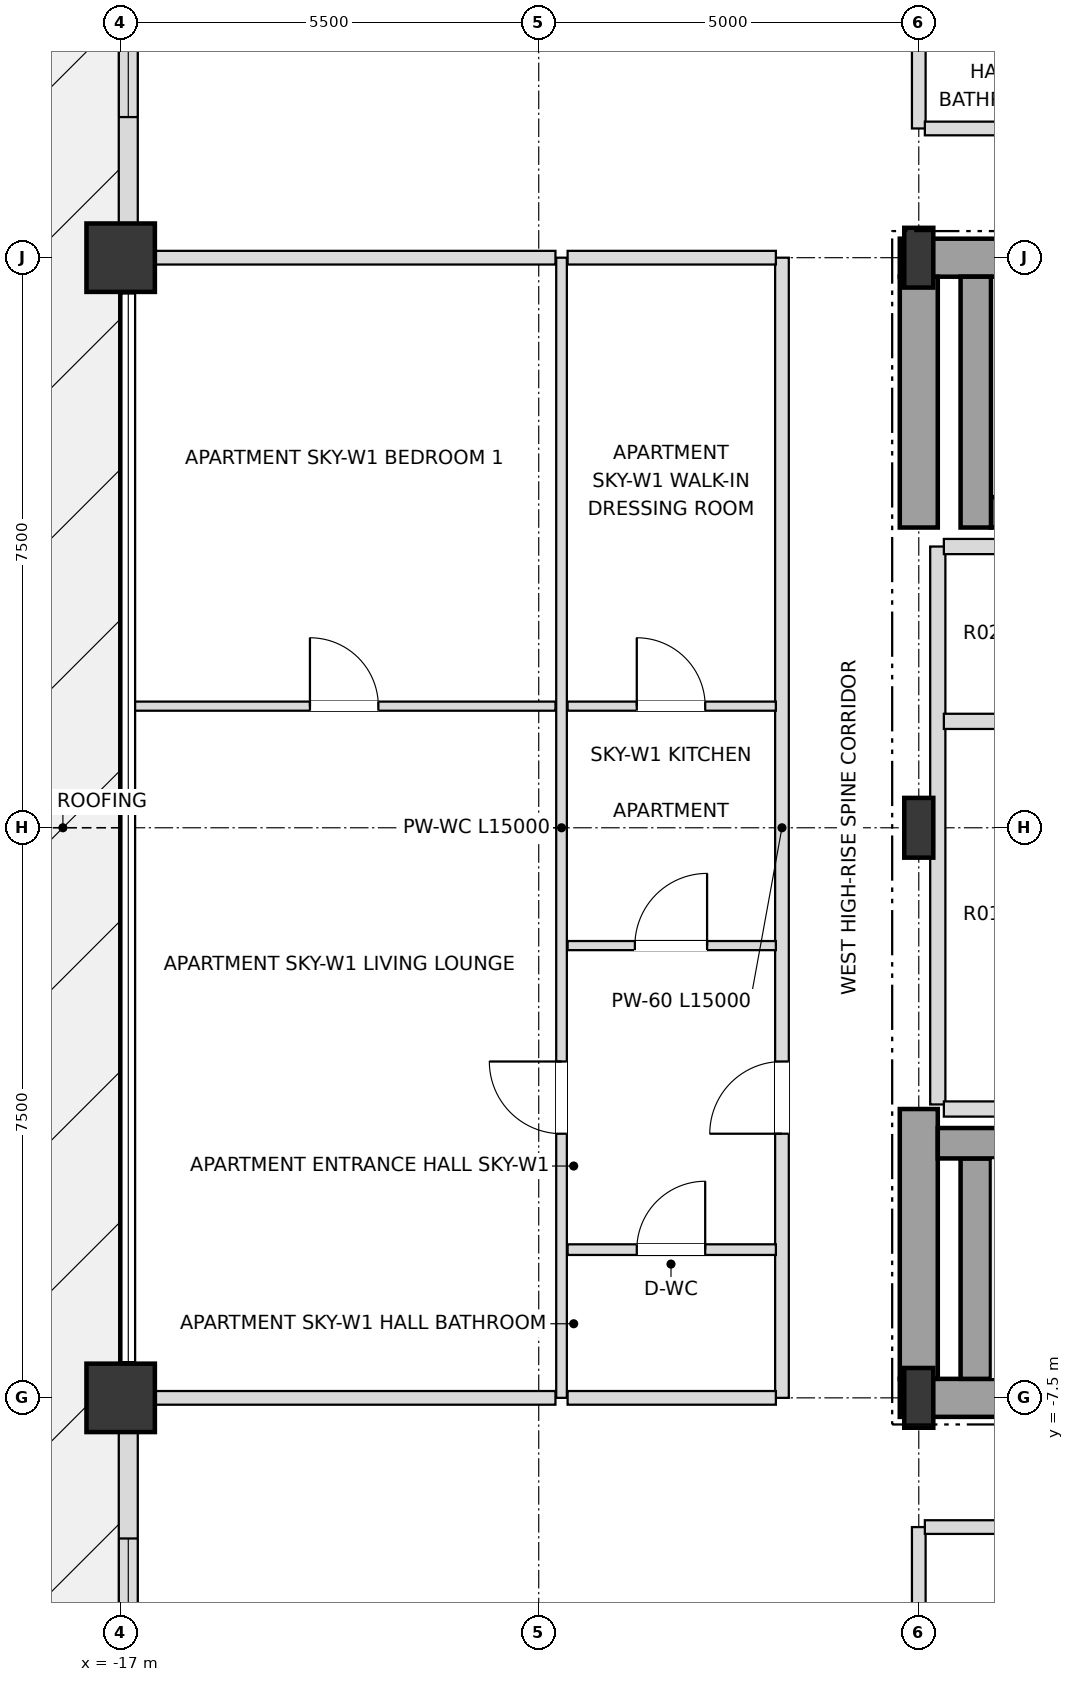
"""IFC4 building model, lengths in metres.
Left out: names, types, materials, properties, quantities, classifications, styles, units other than length and angle.
Written with IfcOpenShell. Run it as: python <this file> out.ifc"""

import sys

from ifc_helpers import new_model, si_unit, direction, frame, frame_2d, origin, origin_2d, place, context, subcontext, project, spatial, rectangle, i_section, extrude, element, fill, save


model = new_model("IFC4")
c1 = context("Model", 3, precision=1e-05, world=origin(), true_north=direction((0.0, 1.0)))
c2 = subcontext(c1, "Body", "Model", "MODEL_VIEW")
j1 = project(units=[si_unit("LENGTHUNIT", "METRE"), si_unit("PLANEANGLEUNIT", "RADIAN")], contexts=[c1])
p1 = place(None, origin())
s1 = spatial("IfcSite", under=j1, at=p1, CompositionType="ELEMENT")
p2 = place(p1, origin())
s2 = spatial("IfcBuilding", under=s1, at=p2, CompositionType="ELEMENT")
p3 = place(p2, frame((0.0, 0.0, 217.8)))
s3 = spatial("IfcBuildingStorey", under=s2, at=p3, CompositionType="ELEMENT", Elevation=217.8)
for number, where, z_axis, x_axis in (
    (1, (-6.5, -7.5, 0.0), (0.0, 0.0, 1.0), (1.0, 0.0, 0.0)),
    (2, (-6.5, 0.0, 0.0), (0.0, 0.0, 1.0), (1.0, 0.0, 0.0)),
    (3, (-6.5, 7.5, 0.0), (0.0, 0.0, 1.0), (1.0, 0.0, 0.0)),
):
    element("IfcColumn", number, at=place(p3, frame(where, z_axis=z_axis, x_axis=x_axis)), inside=s3, PredefinedType="COLUMN", context=c2, shape_type="SweptSolid", body=[
        extrude(i_section(OverallWidth=0.382, OverallDepth=0.786, WebThickness=0.02, FlangeThickness=0.033, at=origin_2d()), origin(), (0.0, 0.0, 1.0), 4.5),
    ])
for number, where, z_axis, x_axis in (
    (4, (-17.0, 7.5, 0.0), (0.0, 0.0, 1.0), (1.0, 0.0, 0.0)),
    (5, (-17.0, -7.5, 0.0), (0.0, 0.0, 1.0), (1.0, 0.0, 0.0)),
):
    element("IfcColumn", number, at=place(p3, frame(where, z_axis=z_axis, x_axis=x_axis)), inside=s3, PredefinedType="USERDEFINED", context=c2, shape_type="SweptSolid", body=[
        extrude(rectangle(XDim=0.9, YDim=0.9, at=origin_2d()), origin(), (0.0, 0.0, 1.0), 4.5),
    ])
p4 = place(p3, frame((-16.9, 12.555, 0.0), z_axis=(0.0, 0.0, 1.0), x_axis=(0.0, -1.0, 0.0)))
e6 = element("IfcWall", 6, at=p4, inside=s3, PredefinedType="SOLIDWALL", context=c2, shape_type="SweptSolid", body=[
    extrude(rectangle(XDim=4.61, YDim=0.25, at=frame_2d((2.305, 0.0))), origin(), (0.0, 0.0, 1.0), 3.648),
])
p5 = place(p4, frame((1.405, 0.0, 0.72)))
e7 = element("IfcOpeningElement", 7, at=p5, cuts=e6, PredefinedType="OPENING", context=c2, shape_type="SweptSolid", body=[
    extrude(rectangle(XDim=1.8, YDim=1.68, at=frame_2d((0.9, 0.84))), frame((0.0, 0.135, 0.0), z_axis=(0.0, -1.0, 0.0), x_axis=(1.0, 0.0, 0.0)), (0.0, 0.0, 1.0), 0.27),
])
p6 = place(p3, frame((-16.9, -7.945, 0.0), z_axis=(0.0, 0.0, 1.0), x_axis=(0.0, -1.0, 0.0)))
e8 = element("IfcWall", 8, at=p6, inside=s3, PredefinedType="SOLIDWALL", context=c2, shape_type="SweptSolid", body=[
    extrude(rectangle(XDim=4.61, YDim=0.25, at=frame_2d((2.305, 0.0))), origin(), (0.0, 0.0, 1.0), 3.648),
])
p7 = place(p6, frame((1.405, 0.0, 0.72)))
e9 = element("IfcOpeningElement", 9, at=p7, cuts=e8, PredefinedType="OPENING", context=c2, shape_type="SweptSolid", body=[
    extrude(rectangle(XDim=1.8, YDim=1.68, at=frame_2d((0.9, 0.84))), frame((0.0, 0.135, 0.0), z_axis=(0.0, -1.0, 0.0), x_axis=(1.0, 0.0, 0.0)), (0.0, 0.0, 1.0), 0.27),
])
p8 = place(p3, frame((-6.75, -7.5, 0.0), z_axis=(0.0, 0.0, 1.0), x_axis=(1.0, 0.0, 0.0)))
e10 = element("IfcWall", 10, at=p8, inside=s3, PredefinedType="SHEAR", context=c2, shape_type="SweptSolid", body=[
    extrude(rectangle(XDim=6.75, YDim=0.5, at=frame_2d((3.375, 0.0))), origin(), (0.0, 0.0, 1.0), 4.28),
])
p9 = place(p3, frame((-6.75, 7.5, 0.0), z_axis=(0.0, 0.0, 1.0), x_axis=(1.0, 0.0, 0.0)))
e11 = element("IfcWall", 11, at=p9, inside=s3, PredefinedType="SHEAR", context=c2, shape_type="SweptSolid", body=[
    extrude(rectangle(XDim=6.75, YDim=0.5, at=frame_2d((3.375, 0.0))), origin(), (0.0, 0.0, 1.0), 4.28),
])
p10 = place(p9, frame((1.65, 0.0, 0.0)))
e12 = element("IfcOpeningElement", 12, at=p10, cuts=e11, PredefinedType="OPENING", context=c2, shape_type="SweptSolid", body=[
    extrude(rectangle(XDim=1.05, YDim=2.15, at=frame_2d((0.525, 1.075))), frame((0.0, 0.26, 0.0), z_axis=(0.0, -1.0, 0.0), x_axis=(1.0, 0.0, 0.0)), (0.0, 0.0, 1.0), 0.52),
])
p11 = place(p3, frame((-6.5, -7.25, 0.0), z_axis=(0.0, 0.0, 1.0), x_axis=(0.0, 1.0, 0.0)))
e13 = element("IfcWall", 13, at=p11, inside=s3, PredefinedType="SHEAR", context=c2, shape_type="SweptSolid", body=[
    extrude(rectangle(XDim=3.55, YDim=0.5, at=frame_2d((1.775, 0.0))), origin(), (0.0, 0.0, 1.0), 4.28),
])
p12 = place(p3, frame((-6.5, 3.95, 0.0), z_axis=(0.0, 0.0, 1.0), x_axis=(0.0, 1.0, 0.0)))
e14 = element("IfcWall", 14, at=p12, inside=s3, PredefinedType="SHEAR", context=c2, shape_type="SweptSolid", body=[
    extrude(rectangle(XDim=3.3, YDim=0.5, at=frame_2d((1.65, 0.0))), origin(), (0.0, 0.0, 1.0), 4.28),
])
p13 = place(p3, frame((-5.75, -7.25, 0.0), z_axis=(0.0, 0.0, 1.0), x_axis=(0.0, 1.0, 0.0)))
e15 = element("IfcWall", 15, at=p13, inside=s3, PredefinedType="SHEAR", context=c2, shape_type="SweptSolid", body=[
    extrude(rectangle(XDim=2.9, YDim=0.4, at=frame_2d((1.45, 0.0))), origin(), (0.0, 0.0, 1.0), 4.28),
])
p14 = place(p3, frame((-6.25, -4.15, 0.0), z_axis=(0.0, 0.0, 1.0), x_axis=(1.0, 0.0, 0.0)))
e16 = element("IfcWall", 16, at=p14, inside=s3, PredefinedType="SHEAR", context=c2, shape_type="SweptSolid", body=[
    extrude(rectangle(XDim=7.78, YDim=0.4, at=frame_2d((3.89, 0.0))), origin(), (0.0, 0.0, 1.0), 4.28),
])
p15 = place(p3, frame((-5.55, 4.15, 0.0), z_axis=(0.0, 0.0, 1.0), x_axis=(1.0, 0.0, 0.0)))
e17 = element("IfcWall", 17, at=p15, inside=s3, PredefinedType="SHEAR", context=c2, shape_type="SweptSolid", body=[
    extrude(rectangle(XDim=7.08, YDim=0.4, at=frame_2d((3.54, 0.0))), origin(), (0.0, 0.0, 1.0), 4.28),
])
p16 = place(p3, frame((-5.75, 3.95, 0.0), z_axis=(0.0, 0.0, 1.0), x_axis=(0.0, 1.0, 0.0)))
e18 = element("IfcWall", 18, at=p16, inside=s3, PredefinedType="SHEAR", context=c2, shape_type="SweptSolid", body=[
    extrude(rectangle(XDim=3.3, YDim=0.4, at=frame_2d((1.65, 0.0))), origin(), (0.0, 0.0, 1.0), 4.28),
])
p17 = place(p3, frame((-11.2, -7.5, 0.0), z_axis=(0.0, 0.0, 1.0), x_axis=(0.0, 1.0, 0.0)))
e19 = element("IfcWall", 19, at=p17, inside=s3, PredefinedType="PARTITIONING", context=c2, shape_type="SweptSolid", body=[
    extrude(rectangle(XDim=15.0, YDim=0.14, at=frame_2d((7.5, 0.0))), origin(), (0.0, 0.0, 1.0), 4.28),
])
p18 = place(p17, frame((3.475, 0.0, 0.0)))
e20 = element("IfcOpeningElement", 20, at=p18, cuts=e19, PredefinedType="OPENING", context=c2, shape_type="SweptSolid", body=[
    extrude(rectangle(XDim=0.95, YDim=2.1, at=frame_2d((0.475, 1.05))), frame((0.0, 0.08, 0.0), z_axis=(0.0, -1.0, 0.0), x_axis=(1.0, 0.0, 0.0)), (0.0, 0.0, 1.0), 0.16),
])
p19 = place(p3, frame((-8.3, -7.5, 0.0), z_axis=(0.0, 0.0, 1.0), x_axis=(0.0, 1.0, 0.0)))
e21 = element("IfcWall", 21, at=p19, inside=s3, PredefinedType="PARTITIONING", context=c2, shape_type="SweptSolid", body=[
    extrude(rectangle(XDim=15.0, YDim=0.18, at=frame_2d((7.5, 0.0))), origin(), (0.0, 0.0, 1.0), 4.28),
])
p20 = place(p19, frame((3.475, 0.0, 0.0)))
e22 = element("IfcOpeningElement", 22, at=p20, cuts=e21, PredefinedType="OPENING", context=c2, shape_type="SweptSolid", body=[
    extrude(rectangle(XDim=0.95, YDim=2.15, at=frame_2d((0.475, 1.075))), frame((0.0, 0.1, 0.0), z_axis=(0.0, -1.0, 0.0), x_axis=(1.0, 0.0, 0.0)), (0.0, 0.0, 1.0), 0.2),
])
for number, where, z_axis, x_axis in (
    (23, (-6.5, -19.9, 0.0), (0.0, 0.0, 1.0), (0.0, 1.0, 0.0)),
    (24, (-6.5, 9.2, 0.0), (0.0, 0.0, 1.0), (0.0, 1.0, 0.0)),
):
    element("IfcWall", number, at=place(p3, frame(where, z_axis=z_axis, x_axis=x_axis)), inside=s3, PredefinedType="PARTITIONING", context=c2, shape_type="SweptSolid", body=[
        extrude(rectangle(XDim=10.7, YDim=0.18, at=frame_2d((5.35, 0.0))), origin(), (0.0, 0.0, 1.0), 3.726),
    ])
p21 = place(p3, frame((-6.25, -3.64, 0.0), z_axis=(0.0, 0.0, 1.0), x_axis=(0.0, 1.0, 0.0)))
e25 = element("IfcWall", 25, at=p21, inside=s3, PredefinedType="SOLIDWALL", context=c2, shape_type="SweptSolid", body=[
    extrude(rectangle(XDim=7.34, YDim=0.2, at=frame_2d((3.67, 0.0))), origin(), (0.0, 0.0, 1.0), 4.28),
])
p22 = place(p3, frame((-6.42, -9.2, 0.0), z_axis=(0.0, 0.0, 1.0), x_axis=(1.0, 0.0, 0.0)))
e26 = element("IfcWall", 26, at=p22, inside=s3, PredefinedType="PARTITIONING", context=c2, shape_type="SweptSolid", body=[
    extrude(rectangle(XDim=6.34, YDim=0.18, at=frame_2d((3.17, 0.0))), origin(), (0.0, 0.0, 1.0), 4.28),
])
p23 = place(p22, frame((2.745, 0.0, 0.0)))
e27 = element("IfcOpeningElement", 27, at=p23, cuts=e26, PredefinedType="OPENING", context=c2, shape_type="SweptSolid", body=[
    extrude(rectangle(XDim=0.95, YDim=2.15, at=frame_2d((0.475, 1.075))), frame((0.0, 0.1, 0.0), z_axis=(0.0, -1.0, 0.0), x_axis=(1.0, 0.0, 0.0)), (0.0, 0.0, 1.0), 0.2),
])
p24 = place(p3, frame((-16.9, -7.5, 0.0), z_axis=(0.0, 0.0, 1.0), x_axis=(1.0, 0.0, 0.0)))
e28 = element("IfcWall", 28, at=p24, inside=s3, PredefinedType="PARTITIONING", context=c2, shape_type="SweptSolid", body=[
    extrude(rectangle(XDim=5.62, YDim=0.18, at=frame_2d((2.81, 0.0))), origin(), (0.0, 0.0, 1.0), 3.726),
])
p25 = place(p3, frame((-11.12, -7.5, 0.0), z_axis=(0.0, 0.0, 1.0), x_axis=(1.0, 0.0, 0.0)))
e29 = element("IfcWall", 29, at=p25, inside=s3, PredefinedType="PARTITIONING", context=c2, shape_type="SweptSolid", body=[
    extrude(rectangle(XDim=2.74, YDim=0.18, at=frame_2d((1.37, 0.0))), origin(), (0.0, 0.0, 1.0), 3.726),
])
p26 = place(p3, frame((-11.12, -5.55, 0.0), z_axis=(0.0, 0.0, 1.0), x_axis=(1.0, 0.0, 0.0)))
e30 = element("IfcWall", 30, at=p26, inside=s3, PredefinedType="PARTITIONING", context=c2, shape_type="SweptSolid", body=[
    extrude(rectangle(XDim=2.74, YDim=0.14, at=frame_2d((1.37, 0.0))), origin(), (0.0, 0.0, 1.0), 4.28),
])
p27 = place(p26, frame((0.91, 0.0, 0.0)))
e31 = element("IfcOpeningElement", 31, at=p27, cuts=e30, PredefinedType="OPENING", context=c2, shape_type="SweptSolid", body=[
    extrude(rectangle(XDim=0.9, YDim=2.1, at=frame_2d((0.45, 1.05))), frame((0.0, 0.08, 0.0), z_axis=(0.0, -1.0, 0.0), x_axis=(1.0, 0.0, 0.0)), (0.0, 0.0, 1.0), 0.16),
])
p28 = place(p3, frame((-6.17, -3.7, 0.0), z_axis=(0.0, 0.0, 1.0), x_axis=(1.0, 0.0, 0.0)))
e32 = element("IfcWall", 32, at=p28, inside=s3, PredefinedType="SOLIDWALL", context=c2, shape_type="SweptSolid", body=[
    extrude(rectangle(XDim=1.94, YDim=0.2, at=frame_2d((0.97, 0.0))), origin(), (0.0, 0.0, 1.0), 4.28),
])
p29 = place(p3, frame((-11.12, -1.55, 0.0), z_axis=(0.0, 0.0, 1.0), x_axis=(1.0, 0.0, 0.0)))
e33 = element("IfcWall", 33, at=p29, inside=s3, PredefinedType="PARTITIONING", context=c2, shape_type="SweptSolid", body=[
    extrude(rectangle(XDim=2.74, YDim=0.12, at=frame_2d((1.37, 0.0))), origin(), (0.0, 0.0, 1.0), 4.28),
])
p30 = place(p29, frame((0.885, 0.0, 0.0)))
e34 = element("IfcOpeningElement", 34, at=p30, cuts=e33, PredefinedType="OPENING", context=c2, shape_type="SweptSolid", body=[
    extrude(rectangle(XDim=0.95, YDim=2.1, at=frame_2d((0.475, 1.05))), frame((0.0, 0.07, 0.0), z_axis=(0.0, -1.0, 0.0), x_axis=(1.0, 0.0, 0.0)), (0.0, 0.0, 1.0), 0.14),
])
p31 = place(p3, frame((-6.17, 1.4, 0.0), z_axis=(0.0, 0.0, 1.0), x_axis=(1.0, 0.0, 0.0)))
e35 = element("IfcWall", 35, at=p31, inside=s3, PredefinedType="SOLIDWALL", context=c2, shape_type="SweptSolid", body=[
    extrude(rectangle(XDim=1.94, YDim=0.2, at=frame_2d((0.97, 0.0))), origin(), (0.0, 0.0, 1.0), 4.28),
])
p32 = place(p3, frame((-16.82, 1.6, 0.0), z_axis=(0.0, 0.0, 1.0), x_axis=(1.0, 0.0, 0.0)))
e36 = element("IfcWall", 36, at=p32, inside=s3, PredefinedType="PARTITIONING", context=c2, shape_type="SweptSolid", body=[
    extrude(rectangle(XDim=5.54, YDim=0.12, at=frame_2d((2.77, 0.0))), origin(), (0.0, 0.0, 1.0), 3.918),
])
p33 = place(p32, frame((2.31, 0.0, 0.0)))
e37 = element("IfcOpeningElement", 37, at=p33, cuts=e36, PredefinedType="OPENING", context=c2, shape_type="SweptSolid", body=[
    extrude(rectangle(XDim=0.9, YDim=2.1, at=frame_2d((0.45, 1.05))), frame((0.0, 0.07, 0.0), z_axis=(0.0, -1.0, 0.0), x_axis=(1.0, 0.0, 0.0)), (0.0, 0.0, 1.0), 0.14),
])
p34 = place(p3, frame((-11.12, 1.6, 0.0), z_axis=(0.0, 0.0, 1.0), x_axis=(1.0, 0.0, 0.0)))
e38 = element("IfcWall", 38, at=p34, inside=s3, PredefinedType="PARTITIONING", context=c2, shape_type="SweptSolid", body=[
    extrude(rectangle(XDim=2.74, YDim=0.12, at=frame_2d((1.37, 0.0))), origin(), (0.0, 0.0, 1.0), 4.28),
])
p35 = place(p34, frame((0.91, 0.0, 0.0)))
e39 = element("IfcOpeningElement", 39, at=p35, cuts=e38, PredefinedType="OPENING", context=c2, shape_type="SweptSolid", body=[
    extrude(rectangle(XDim=0.9, YDim=2.1, at=frame_2d((0.45, 1.05))), frame((0.0, 0.07, 0.0), z_axis=(0.0, -1.0, 0.0), x_axis=(1.0, 0.0, 0.0)), (0.0, 0.0, 1.0), 0.14),
])
p36 = place(p3, frame((-6.17, 3.7, 0.0), z_axis=(0.0, 0.0, 1.0), x_axis=(1.0, 0.0, 0.0)))
e40 = element("IfcWall", 40, at=p36, inside=s3, PredefinedType="SOLIDWALL", context=c2, shape_type="SweptSolid", body=[
    extrude(rectangle(XDim=1.94, YDim=0.2, at=frame_2d((0.97, 0.0))), origin(), (0.0, 0.0, 1.0), 4.28),
])
p37 = place(p3, frame((-16.9, 7.5, 0.0), z_axis=(0.0, 0.0, 1.0), x_axis=(1.0, 0.0, 0.0)))
e41 = element("IfcWall", 41, at=p37, inside=s3, PredefinedType="PARTITIONING", context=c2, shape_type="SweptSolid", body=[
    extrude(rectangle(XDim=5.62, YDim=0.18, at=frame_2d((2.81, 0.0))), origin(), (0.0, 0.0, 1.0), 3.726),
])
p38 = place(p3, frame((-11.12, 7.5, 0.0), z_axis=(0.0, 0.0, 1.0), x_axis=(1.0, 0.0, 0.0)))
e42 = element("IfcWall", 42, at=p38, inside=s3, PredefinedType="PARTITIONING", context=c2, shape_type="SweptSolid", body=[
    extrude(rectangle(XDim=2.74, YDim=0.18, at=frame_2d((1.37, 0.0))), origin(), (0.0, 0.0, 1.0), 3.726),
])
p39 = place(p3, frame((-6.42, 9.2, 0.0), z_axis=(0.0, 0.0, 1.0), x_axis=(1.0, 0.0, 0.0)))
e43 = element("IfcWall", 43, at=p39, inside=s3, PredefinedType="PARTITIONING", context=c2, shape_type="SweptSolid", body=[
    extrude(rectangle(XDim=1.79, YDim=0.18, at=frame_2d((0.895, 0.0))), origin(), (0.0, 0.0, 1.0), 4.28),
])
p40 = place(p5, origin())
e44 = element("IfcWindow", 44, at=p40, inside=s3, PartitioningType="SINGLE_PANEL", PredefinedType="WINDOW", context=c2, shape_type="SweptSolid", body=[
    extrude(rectangle(XDim=1.8, YDim=1.68, at=frame_2d((0.9, 0.84))), frame((0.0, 0.03, 0.0), z_axis=(0.0, -1.0, 0.0), x_axis=(1.0, 0.0, 0.0)), (0.0, 0.0, 1.0), 0.06),
])
fill(e7, e44)
p41 = place(p7, origin())
e45 = element("IfcWindow", 45, at=p41, inside=s3, PartitioningType="SINGLE_PANEL", PredefinedType="WINDOW", context=c2, shape_type="SweptSolid", body=[
    extrude(rectangle(XDim=1.8, YDim=1.68, at=frame_2d((0.9, 0.84))), frame((0.0, 0.03, 0.0), z_axis=(0.0, -1.0, 0.0), x_axis=(1.0, 0.0, 0.0)), (0.0, 0.0, 1.0), 0.06),
])
fill(e9, e45)
p42 = place(p27, origin())
e46 = element("IfcDoor", 46, at=p42, inside=s3, OperationType="SINGLE_SWING_RIGHT", PredefinedType="DOOR", context=c2, shape_type="SweptSolid", body=[
    extrude(rectangle(XDim=0.9, YDim=2.1, at=frame_2d((0.45, 1.05))), frame((0.0, 0.025, 0.0), z_axis=(0.0, -1.0, 0.0), x_axis=(1.0, 0.0, 0.0)), (0.0, 0.0, 1.0), 0.05),
])
fill(e31, e46)
p43 = place(p20, origin())
e47 = element("IfcDoor", 47, at=p43, inside=s3, OperationType="SINGLE_SWING_LEFT", PredefinedType="DOOR", context=c2, shape_type="SweptSolid", body=[
    extrude(rectangle(XDim=0.95, YDim=2.15, at=frame_2d((0.475, 1.075))), frame((0.0, 0.025, 0.0), z_axis=(0.0, -1.0, 0.0), x_axis=(1.0, 0.0, 0.0)), (0.0, 0.0, 1.0), 0.05),
])
fill(e22, e47)
p44 = place(p30, origin())
e48 = element("IfcDoor", 48, at=p44, inside=s3, OperationType="SINGLE_SWING_RIGHT", PredefinedType="DOOR", context=c2, shape_type="SweptSolid", body=[
    extrude(rectangle(XDim=0.95, YDim=2.1, at=frame_2d((0.475, 1.05))), frame((0.0, 0.025, 0.0), z_axis=(0.0, -1.0, 0.0), x_axis=(1.0, 0.0, 0.0)), (0.0, 0.0, 1.0), 0.05),
])
fill(e34, e48)
p45 = place(p35, origin())
e49 = element("IfcDoor", 49, at=p45, inside=s3, OperationType="SINGLE_SWING_LEFT", PredefinedType="DOOR", context=c2, shape_type="SweptSolid", body=[
    extrude(rectangle(XDim=0.9, YDim=2.1, at=frame_2d((0.45, 1.05))), frame((0.0, 0.025, 0.0), z_axis=(0.0, -1.0, 0.0), x_axis=(1.0, 0.0, 0.0)), (0.0, 0.0, 1.0), 0.05),
])
fill(e39, e49)
p46 = place(p18, origin())
e50 = element("IfcDoor", 50, at=p46, inside=s3, OperationType="SINGLE_SWING_RIGHT", PredefinedType="DOOR", context=c2, shape_type="SweptSolid", body=[
    extrude(rectangle(XDim=0.95, YDim=2.1, at=frame_2d((0.475, 1.05))), frame((0.0, 0.025, 0.0), z_axis=(0.0, -1.0, 0.0), x_axis=(1.0, 0.0, 0.0)), (0.0, 0.0, 1.0), 0.05),
])
fill(e20, e50)
p47 = place(p33, origin())
e51 = element("IfcDoor", 51, at=p47, inside=s3, OperationType="SINGLE_SWING_LEFT", PredefinedType="DOOR", context=c2, shape_type="SweptSolid", body=[
    extrude(rectangle(XDim=0.9, YDim=2.1, at=frame_2d((0.45, 1.05))), frame((0.0, 0.025, 0.0), z_axis=(0.0, -1.0, 0.0), x_axis=(1.0, 0.0, 0.0)), (0.0, 0.0, 1.0), 0.05),
])
fill(e37, e51)
save(model, sys.argv[1])
